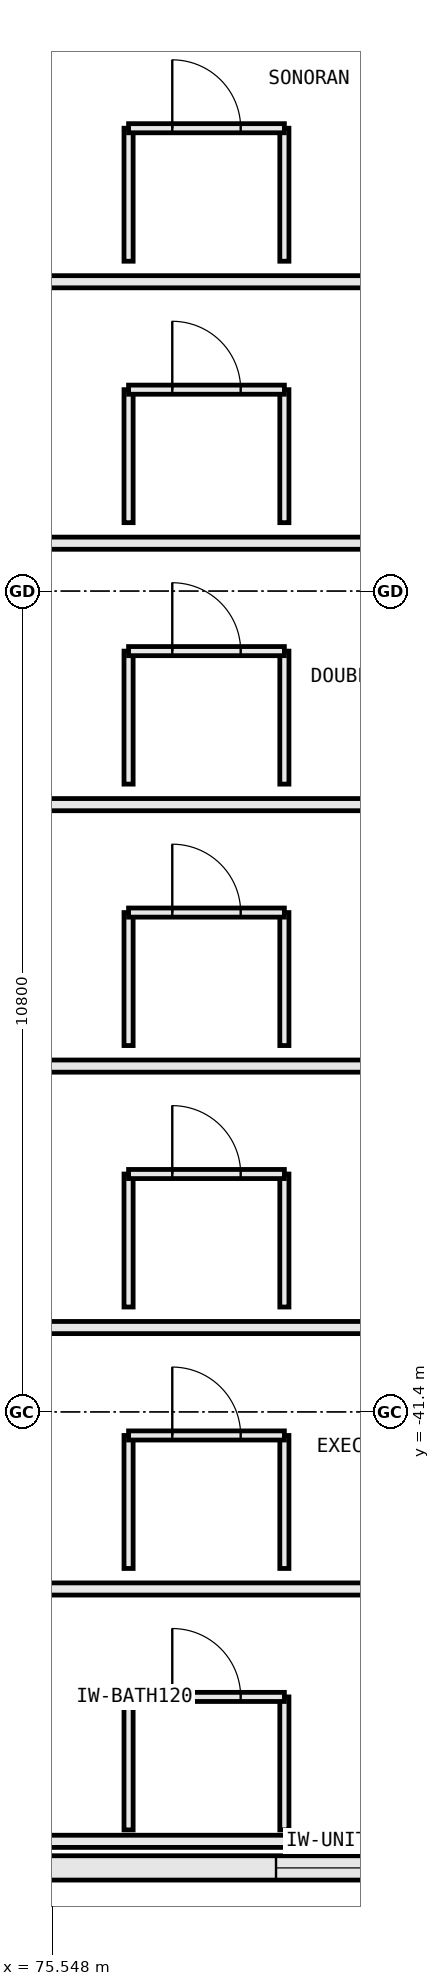
"""IFC4 building model, lengths in metres.
Left out: names, types, materials, properties, quantities, classifications, styles, units other than length and angle.
Written with IfcOpenShell. Run it as: python <this file> out.ifc"""

import sys

from ifc_helpers import new_model, si_unit, direction, frame, frame_2d, origin, place, context, subcontext, project, spatial, rectangle, extrude, element, fill, save


model = new_model("IFC4")
c1 = context("Model", 3, precision=1e-05, world=origin(), true_north=direction((0.0, 1.0)))
c2 = subcontext(c1, "Body", "Model", "MODEL_VIEW")
j1 = project(units=[si_unit("LENGTHUNIT", "METRE"), si_unit("PLANEANGLEUNIT", "RADIAN")], contexts=[c1])
p1 = place(None, origin())
s1 = spatial("IfcSite", under=j1, at=p1, CompositionType="ELEMENT")
p2 = place(p1, origin())
s2 = spatial("IfcBuilding", under=s1, at=p2, CompositionType="ELEMENT")
p3 = place(p2, frame((0.0, 0.0, 20.0)))
s3 = spatial("IfcBuildingStorey", under=s2, at=p3, CompositionType="ELEMENT", Elevation=20.0)
p4 = place(p3, frame((75.058, -47.4, 0.0), z_axis=(0.0, 0.0, 1.0), x_axis=(1.0, 0.0, 0.0)))
e1 = element("IfcWall", 1, at=p4, inside=s3, PredefinedType="STANDARD", context=c2, shape_type="SweptSolid", body=[
    extrude(rectangle(XDim=8.664, YDim=0.32, at=frame_2d((4.332, 0.0))), origin(), (0.0, 0.0, 1.0), 2.905),
])
p5 = place(p4, frame((3.432, 0.0, 0.85)))
e2 = element("IfcOpeningElement", 2, at=p5, cuts=e1, PredefinedType="OPENING", context=c2, shape_type="SweptSolid", body=[
    extrude(rectangle(XDim=1.8, YDim=1.85, at=frame_2d((0.9, 0.925))), frame((0.0, 0.172, 0.0), z_axis=(0.0, -1.0, 0.0), x_axis=(1.0, 0.0, 0.0)), (0.0, 0.0, 1.0), 0.344),
])
p6 = place(p3, frame((71.05, -47.05, 0.0), z_axis=(0.0, 0.0, 1.0), x_axis=(1.0, 0.0, 0.0)))
e3 = element("IfcWall", 3, at=p6, inside=s3, PredefinedType="PARTITIONING", context=c2, shape_type="SweptSolid", body=[
    extrude(rectangle(XDim=12.79, YDim=0.16, at=frame_2d((6.395, 0.0))), origin(), (0.0, 0.0, 1.0), 2.685),
])
p7 = place(p3, frame((71.05, -43.73, 0.0), z_axis=(0.0, 0.0, 1.0), x_axis=(1.0, 0.0, 0.0)))
e4 = element("IfcWall", 4, at=p7, inside=s3, PredefinedType="PARTITIONING", context=c2, shape_type="SweptSolid", body=[
    extrude(rectangle(XDim=12.79, YDim=0.16, at=frame_2d((6.395, 0.0))), origin(), (0.0, 0.0, 1.0), 3.55),
])
for number, where, z_axis, x_axis in (
    (5, (76.55, -46.9, 0.0), (0.0, 0.0, 1.0), (0.0, 1.0, 0.0)),
    (6, (78.6, -46.9, 0.0), (0.0, 0.0, 1.0), (0.0, 1.0, 0.0)),
):
    element("IfcWall", number, at=place(p3, frame(where, z_axis=z_axis, x_axis=x_axis)), inside=s3, PredefinedType="PARTITIONING", context=c2, shape_type="SweptSolid", body=[
        extrude(rectangle(XDim=1.75, YDim=0.12, at=frame_2d((0.875, 0.0))), origin(), (0.0, 0.0, 1.0), 3.55),
    ])
p8 = place(p3, frame((76.55, -45.15, 0.0), z_axis=(0.0, 0.0, 1.0), x_axis=(1.0, 0.0, 0.0)))
e7 = element("IfcWall", 7, at=p8, inside=s3, PredefinedType="PARTITIONING", context=c2, shape_type="SweptSolid", body=[
    extrude(rectangle(XDim=2.05, YDim=0.12, at=frame_2d((1.025, 0.0))), origin(), (0.0, 0.0, 1.0), 3.55),
])
p9 = place(p8, frame((0.575, 0.0, 0.0)))
e8 = element("IfcOpeningElement", 8, at=p9, cuts=e7, PredefinedType="OPENING", context=c2, shape_type="SweptSolid", body=[
    extrude(rectangle(XDim=0.9, YDim=2.15, at=frame_2d((0.45, 1.075))), frame((0.0, 0.072, 0.0), z_axis=(0.0, -1.0, 0.0), x_axis=(1.0, 0.0, 0.0)), (0.0, 0.0, 1.0), 0.144),
])
p10 = place(p3, frame((71.05, -40.29, 0.0), z_axis=(0.0, 0.0, 1.0), x_axis=(1.0, 0.0, 0.0)))
e9 = element("IfcWall", 9, at=p10, inside=s3, PredefinedType="PARTITIONING", context=c2, shape_type="SweptSolid", body=[
    extrude(rectangle(XDim=12.79, YDim=0.16, at=frame_2d((6.395, 0.0))), origin(), (0.0, 0.0, 1.0), 3.55),
])
for number, where, z_axis, x_axis in (
    (10, (76.55, -43.46, 0.0), (0.0, 0.0, 1.0), (0.0, 1.0, 0.0)),
    (11, (78.6, -43.46, 0.0), (0.0, 0.0, 1.0), (0.0, 1.0, 0.0)),
):
    element("IfcWall", number, at=place(p3, frame(where, z_axis=z_axis, x_axis=x_axis)), inside=s3, PredefinedType="PARTITIONING", context=c2, shape_type="SweptSolid", body=[
        extrude(rectangle(XDim=1.75, YDim=0.12, at=frame_2d((0.875, 0.0))), origin(), (0.0, 0.0, 1.0), 3.55),
    ])
p11 = place(p3, frame((76.55, -41.71, 0.0), z_axis=(0.0, 0.0, 1.0), x_axis=(1.0, 0.0, 0.0)))
e12 = element("IfcWall", 12, at=p11, inside=s3, PredefinedType="PARTITIONING", context=c2, shape_type="SweptSolid", body=[
    extrude(rectangle(XDim=2.05, YDim=0.12, at=frame_2d((1.025, 0.0))), origin(), (0.0, 0.0, 1.0), 3.55),
])
p12 = place(p11, frame((0.575, 0.0, 0.0)))
e13 = element("IfcOpeningElement", 13, at=p12, cuts=e12, PredefinedType="OPENING", context=c2, shape_type="SweptSolid", body=[
    extrude(rectangle(XDim=0.9, YDim=2.15, at=frame_2d((0.45, 1.075))), frame((0.0, 0.072, 0.0), z_axis=(0.0, -1.0, 0.0), x_axis=(1.0, 0.0, 0.0)), (0.0, 0.0, 1.0), 0.144),
])
p13 = place(p3, frame((71.05, -36.85, 0.0), z_axis=(0.0, 0.0, 1.0), x_axis=(1.0, 0.0, 0.0)))
e14 = element("IfcWall", 14, at=p13, inside=s3, PredefinedType="PARTITIONING", context=c2, shape_type="SweptSolid", body=[
    extrude(rectangle(XDim=12.79, YDim=0.16, at=frame_2d((6.395, 0.0))), origin(), (0.0, 0.0, 1.0), 3.55),
])
for number, where, z_axis, x_axis in (
    (15, (76.55, -40.02, 0.0), (0.0, 0.0, 1.0), (0.0, 1.0, 0.0)),
    (16, (78.6, -40.02, 0.0), (0.0, 0.0, 1.0), (0.0, 1.0, 0.0)),
):
    element("IfcWall", number, at=place(p3, frame(where, z_axis=z_axis, x_axis=x_axis)), inside=s3, PredefinedType="PARTITIONING", context=c2, shape_type="SweptSolid", body=[
        extrude(rectangle(XDim=1.75, YDim=0.12, at=frame_2d((0.875, 0.0))), origin(), (0.0, 0.0, 1.0), 3.55),
    ])
p14 = place(p3, frame((76.55, -38.27, 0.0), z_axis=(0.0, 0.0, 1.0), x_axis=(1.0, 0.0, 0.0)))
e17 = element("IfcWall", 17, at=p14, inside=s3, PredefinedType="PARTITIONING", context=c2, shape_type="SweptSolid", body=[
    extrude(rectangle(XDim=2.05, YDim=0.12, at=frame_2d((1.025, 0.0))), origin(), (0.0, 0.0, 1.0), 3.55),
])
p15 = place(p14, frame((0.575, 0.0, 0.0)))
e18 = element("IfcOpeningElement", 18, at=p15, cuts=e17, PredefinedType="OPENING", context=c2, shape_type="SweptSolid", body=[
    extrude(rectangle(XDim=0.9, YDim=2.15, at=frame_2d((0.45, 1.075))), frame((0.0, 0.072, 0.0), z_axis=(0.0, -1.0, 0.0), x_axis=(1.0, 0.0, 0.0)), (0.0, 0.0, 1.0), 0.144),
])
p16 = place(p3, frame((71.05, -33.41, 0.0), z_axis=(0.0, 0.0, 1.0), x_axis=(1.0, 0.0, 0.0)))
e19 = element("IfcWall", 19, at=p16, inside=s3, PredefinedType="PARTITIONING", context=c2, shape_type="SweptSolid", body=[
    extrude(rectangle(XDim=12.79, YDim=0.16, at=frame_2d((6.395, 0.0))), origin(), (0.0, 0.0, 1.0), 3.55),
])
for number, where, z_axis, x_axis in (
    (20, (76.55, -36.58, 0.0), (0.0, 0.0, 1.0), (0.0, 1.0, 0.0)),
    (21, (78.6, -36.58, 0.0), (0.0, 0.0, 1.0), (0.0, 1.0, 0.0)),
):
    element("IfcWall", number, at=place(p3, frame(where, z_axis=z_axis, x_axis=x_axis)), inside=s3, PredefinedType="PARTITIONING", context=c2, shape_type="SweptSolid", body=[
        extrude(rectangle(XDim=1.75, YDim=0.12, at=frame_2d((0.875, 0.0))), origin(), (0.0, 0.0, 1.0), 3.55),
    ])
p17 = place(p3, frame((76.55, -34.83, 0.0), z_axis=(0.0, 0.0, 1.0), x_axis=(1.0, 0.0, 0.0)))
e22 = element("IfcWall", 22, at=p17, inside=s3, PredefinedType="PARTITIONING", context=c2, shape_type="SweptSolid", body=[
    extrude(rectangle(XDim=2.05, YDim=0.12, at=frame_2d((1.025, 0.0))), origin(), (0.0, 0.0, 1.0), 3.55),
])
p18 = place(p17, frame((0.575, 0.0, 0.0)))
e23 = element("IfcOpeningElement", 23, at=p18, cuts=e22, PredefinedType="OPENING", context=c2, shape_type="SweptSolid", body=[
    extrude(rectangle(XDim=0.9, YDim=2.15, at=frame_2d((0.45, 1.075))), frame((0.0, 0.072, 0.0), z_axis=(0.0, -1.0, 0.0), x_axis=(1.0, 0.0, 0.0)), (0.0, 0.0, 1.0), 0.144),
])
p19 = place(p3, frame((71.05, -29.97, 0.0), z_axis=(0.0, 0.0, 1.0), x_axis=(1.0, 0.0, 0.0)))
e24 = element("IfcWall", 24, at=p19, inside=s3, PredefinedType="PARTITIONING", context=c2, shape_type="SweptSolid", body=[
    extrude(rectangle(XDim=12.79, YDim=0.16, at=frame_2d((6.395, 0.0))), origin(), (0.0, 0.0, 1.0), 3.55),
])
for number, where, z_axis, x_axis in (
    (25, (76.55, -33.14, 0.0), (0.0, 0.0, 1.0), (0.0, 1.0, 0.0)),
    (26, (78.6, -33.14, 0.0), (0.0, 0.0, 1.0), (0.0, 1.0, 0.0)),
):
    element("IfcWall", number, at=place(p3, frame(where, z_axis=z_axis, x_axis=x_axis)), inside=s3, PredefinedType="PARTITIONING", context=c2, shape_type="SweptSolid", body=[
        extrude(rectangle(XDim=1.75, YDim=0.12, at=frame_2d((0.875, 0.0))), origin(), (0.0, 0.0, 1.0), 3.55),
    ])
p20 = place(p3, frame((76.55, -31.39, 0.0), z_axis=(0.0, 0.0, 1.0), x_axis=(1.0, 0.0, 0.0)))
e27 = element("IfcWall", 27, at=p20, inside=s3, PredefinedType="PARTITIONING", context=c2, shape_type="SweptSolid", body=[
    extrude(rectangle(XDim=2.05, YDim=0.12, at=frame_2d((1.025, 0.0))), origin(), (0.0, 0.0, 1.0), 3.55),
])
p21 = place(p20, frame((0.575, 0.0, 0.0)))
e28 = element("IfcOpeningElement", 28, at=p21, cuts=e27, PredefinedType="OPENING", context=c2, shape_type="SweptSolid", body=[
    extrude(rectangle(XDim=0.9, YDim=2.15, at=frame_2d((0.45, 1.075))), frame((0.0, 0.072, 0.0), z_axis=(0.0, -1.0, 0.0), x_axis=(1.0, 0.0, 0.0)), (0.0, 0.0, 1.0), 0.144),
])
p22 = place(p3, frame((71.05, -26.53, 0.0), z_axis=(0.0, 0.0, 1.0), x_axis=(1.0, 0.0, 0.0)))
e29 = element("IfcWall", 29, at=p22, inside=s3, PredefinedType="PARTITIONING", context=c2, shape_type="SweptSolid", body=[
    extrude(rectangle(XDim=12.79, YDim=0.16, at=frame_2d((6.395, 0.0))), origin(), (0.0, 0.0, 1.0), 3.55),
])
for number, where, z_axis, x_axis in (
    (30, (76.55, -29.7, 0.0), (0.0, 0.0, 1.0), (0.0, 1.0, 0.0)),
    (31, (78.6, -29.7, 0.0), (0.0, 0.0, 1.0), (0.0, 1.0, 0.0)),
):
    element("IfcWall", number, at=place(p3, frame(where, z_axis=z_axis, x_axis=x_axis)), inside=s3, PredefinedType="PARTITIONING", context=c2, shape_type="SweptSolid", body=[
        extrude(rectangle(XDim=1.75, YDim=0.12, at=frame_2d((0.875, 0.0))), origin(), (0.0, 0.0, 1.0), 3.55),
    ])
p23 = place(p3, frame((76.55, -27.95, 0.0), z_axis=(0.0, 0.0, 1.0), x_axis=(1.0, 0.0, 0.0)))
e32 = element("IfcWall", 32, at=p23, inside=s3, PredefinedType="PARTITIONING", context=c2, shape_type="SweptSolid", body=[
    extrude(rectangle(XDim=2.05, YDim=0.12, at=frame_2d((1.025, 0.0))), origin(), (0.0, 0.0, 1.0), 2.905),
])
p24 = place(p23, frame((0.575, 0.0, 0.0)))
e33 = element("IfcOpeningElement", 33, at=p24, cuts=e32, PredefinedType="OPENING", context=c2, shape_type="SweptSolid", body=[
    extrude(rectangle(XDim=0.9, YDim=2.15, at=frame_2d((0.45, 1.075))), frame((0.0, 0.072, 0.0), z_axis=(0.0, -1.0, 0.0), x_axis=(1.0, 0.0, 0.0)), (0.0, 0.0, 1.0), 0.144),
])
for number, where, z_axis, x_axis in (
    (34, (76.55, -26.26, 0.0), (0.0, 0.0, 1.0), (0.0, 1.0, 0.0)),
    (35, (78.6, -26.26, 0.0), (0.0, 0.0, 1.0), (0.0, 1.0, 0.0)),
):
    element("IfcWall", number, at=place(p3, frame(where, z_axis=z_axis, x_axis=x_axis)), inside=s3, PredefinedType="PARTITIONING", context=c2, shape_type="SweptSolid", body=[
        extrude(rectangle(XDim=1.75, YDim=0.12, at=frame_2d((0.875, 0.0))), origin(), (0.0, 0.0, 1.0), 3.55),
    ])
p25 = place(p3, frame((76.55, -24.51, 0.0), z_axis=(0.0, 0.0, 1.0), x_axis=(1.0, 0.0, 0.0)))
e36 = element("IfcWall", 36, at=p25, inside=s3, PredefinedType="PARTITIONING", context=c2, shape_type="SweptSolid", body=[
    extrude(rectangle(XDim=2.05, YDim=0.12, at=frame_2d((1.025, 0.0))), origin(), (0.0, 0.0, 1.0), 3.55),
])
p26 = place(p25, frame((0.575, 0.0, 0.0)))
e37 = element("IfcOpeningElement", 37, at=p26, cuts=e36, PredefinedType="OPENING", context=c2, shape_type="SweptSolid", body=[
    extrude(rectangle(XDim=0.9, YDim=2.15, at=frame_2d((0.45, 1.075))), frame((0.0, 0.072, 0.0), z_axis=(0.0, -1.0, 0.0), x_axis=(1.0, 0.0, 0.0)), (0.0, 0.0, 1.0), 0.144),
])
p27 = place(p5, origin())
e38 = element("IfcWindow", 38, at=p27, inside=s3, PartitioningType="SINGLE_PANEL", PredefinedType="WINDOW", context=c2, shape_type="SweptSolid", body=[
    extrude(rectangle(XDim=1.8, YDim=1.85, at=frame_2d((0.9, 0.925))), frame((0.0, 0.03, 0.0), z_axis=(0.0, -1.0, 0.0), x_axis=(1.0, 0.0, 0.0)), (0.0, 0.0, 1.0), 0.06),
])
fill(e2, e38)
p28 = place(p9, origin())
e39 = element("IfcDoor", 39, at=p28, inside=s3, OperationType="SINGLE_SWING_LEFT", PredefinedType="DOOR", context=c2, shape_type="SweptSolid", body=[
    extrude(rectangle(XDim=0.9, YDim=2.15, at=frame_2d((0.45, 1.075))), frame((0.0, 0.025, 0.0), z_axis=(0.0, -1.0, 0.0), x_axis=(1.0, 0.0, 0.0)), (0.0, 0.0, 1.0), 0.05),
])
fill(e8, e39)
p29 = place(p12, origin())
e40 = element("IfcDoor", 40, at=p29, inside=s3, OperationType="SINGLE_SWING_LEFT", PredefinedType="DOOR", context=c2, shape_type="SweptSolid", body=[
    extrude(rectangle(XDim=0.9, YDim=2.15, at=frame_2d((0.45, 1.075))), frame((0.0, 0.025, 0.0), z_axis=(0.0, -1.0, 0.0), x_axis=(1.0, 0.0, 0.0)), (0.0, 0.0, 1.0), 0.05),
])
fill(e13, e40)
p30 = place(p15, origin())
e41 = element("IfcDoor", 41, at=p30, inside=s3, OperationType="SINGLE_SWING_LEFT", PredefinedType="DOOR", context=c2, shape_type="SweptSolid", body=[
    extrude(rectangle(XDim=0.9, YDim=2.15, at=frame_2d((0.45, 1.075))), frame((0.0, 0.025, 0.0), z_axis=(0.0, -1.0, 0.0), x_axis=(1.0, 0.0, 0.0)), (0.0, 0.0, 1.0), 0.05),
])
fill(e18, e41)
p31 = place(p18, origin())
e42 = element("IfcDoor", 42, at=p31, inside=s3, OperationType="SINGLE_SWING_LEFT", PredefinedType="DOOR", context=c2, shape_type="SweptSolid", body=[
    extrude(rectangle(XDim=0.9, YDim=2.15, at=frame_2d((0.45, 1.075))), frame((0.0, 0.025, 0.0), z_axis=(0.0, -1.0, 0.0), x_axis=(1.0, 0.0, 0.0)), (0.0, 0.0, 1.0), 0.05),
])
fill(e23, e42)
p32 = place(p21, origin())
e43 = element("IfcDoor", 43, at=p32, inside=s3, OperationType="SINGLE_SWING_LEFT", PredefinedType="DOOR", context=c2, shape_type="SweptSolid", body=[
    extrude(rectangle(XDim=0.9, YDim=2.15, at=frame_2d((0.45, 1.075))), frame((0.0, 0.025, 0.0), z_axis=(0.0, -1.0, 0.0), x_axis=(1.0, 0.0, 0.0)), (0.0, 0.0, 1.0), 0.05),
])
fill(e28, e43)
p33 = place(p24, origin())
e44 = element("IfcDoor", 44, at=p33, inside=s3, OperationType="SINGLE_SWING_LEFT", PredefinedType="DOOR", context=c2, shape_type="SweptSolid", body=[
    extrude(rectangle(XDim=0.9, YDim=2.15, at=frame_2d((0.45, 1.075))), frame((0.0, 0.025, 0.0), z_axis=(0.0, -1.0, 0.0), x_axis=(1.0, 0.0, 0.0)), (0.0, 0.0, 1.0), 0.05),
])
fill(e33, e44)
p34 = place(p26, origin())
e45 = element("IfcDoor", 45, at=p34, inside=s3, OperationType="SINGLE_SWING_LEFT", PredefinedType="DOOR", context=c2, shape_type="SweptSolid", body=[
    extrude(rectangle(XDim=0.9, YDim=2.15, at=frame_2d((0.45, 1.075))), frame((0.0, 0.025, 0.0), z_axis=(0.0, -1.0, 0.0), x_axis=(1.0, 0.0, 0.0)), (0.0, 0.0, 1.0), 0.05),
])
fill(e37, e45)
save(model, sys.argv[1])
